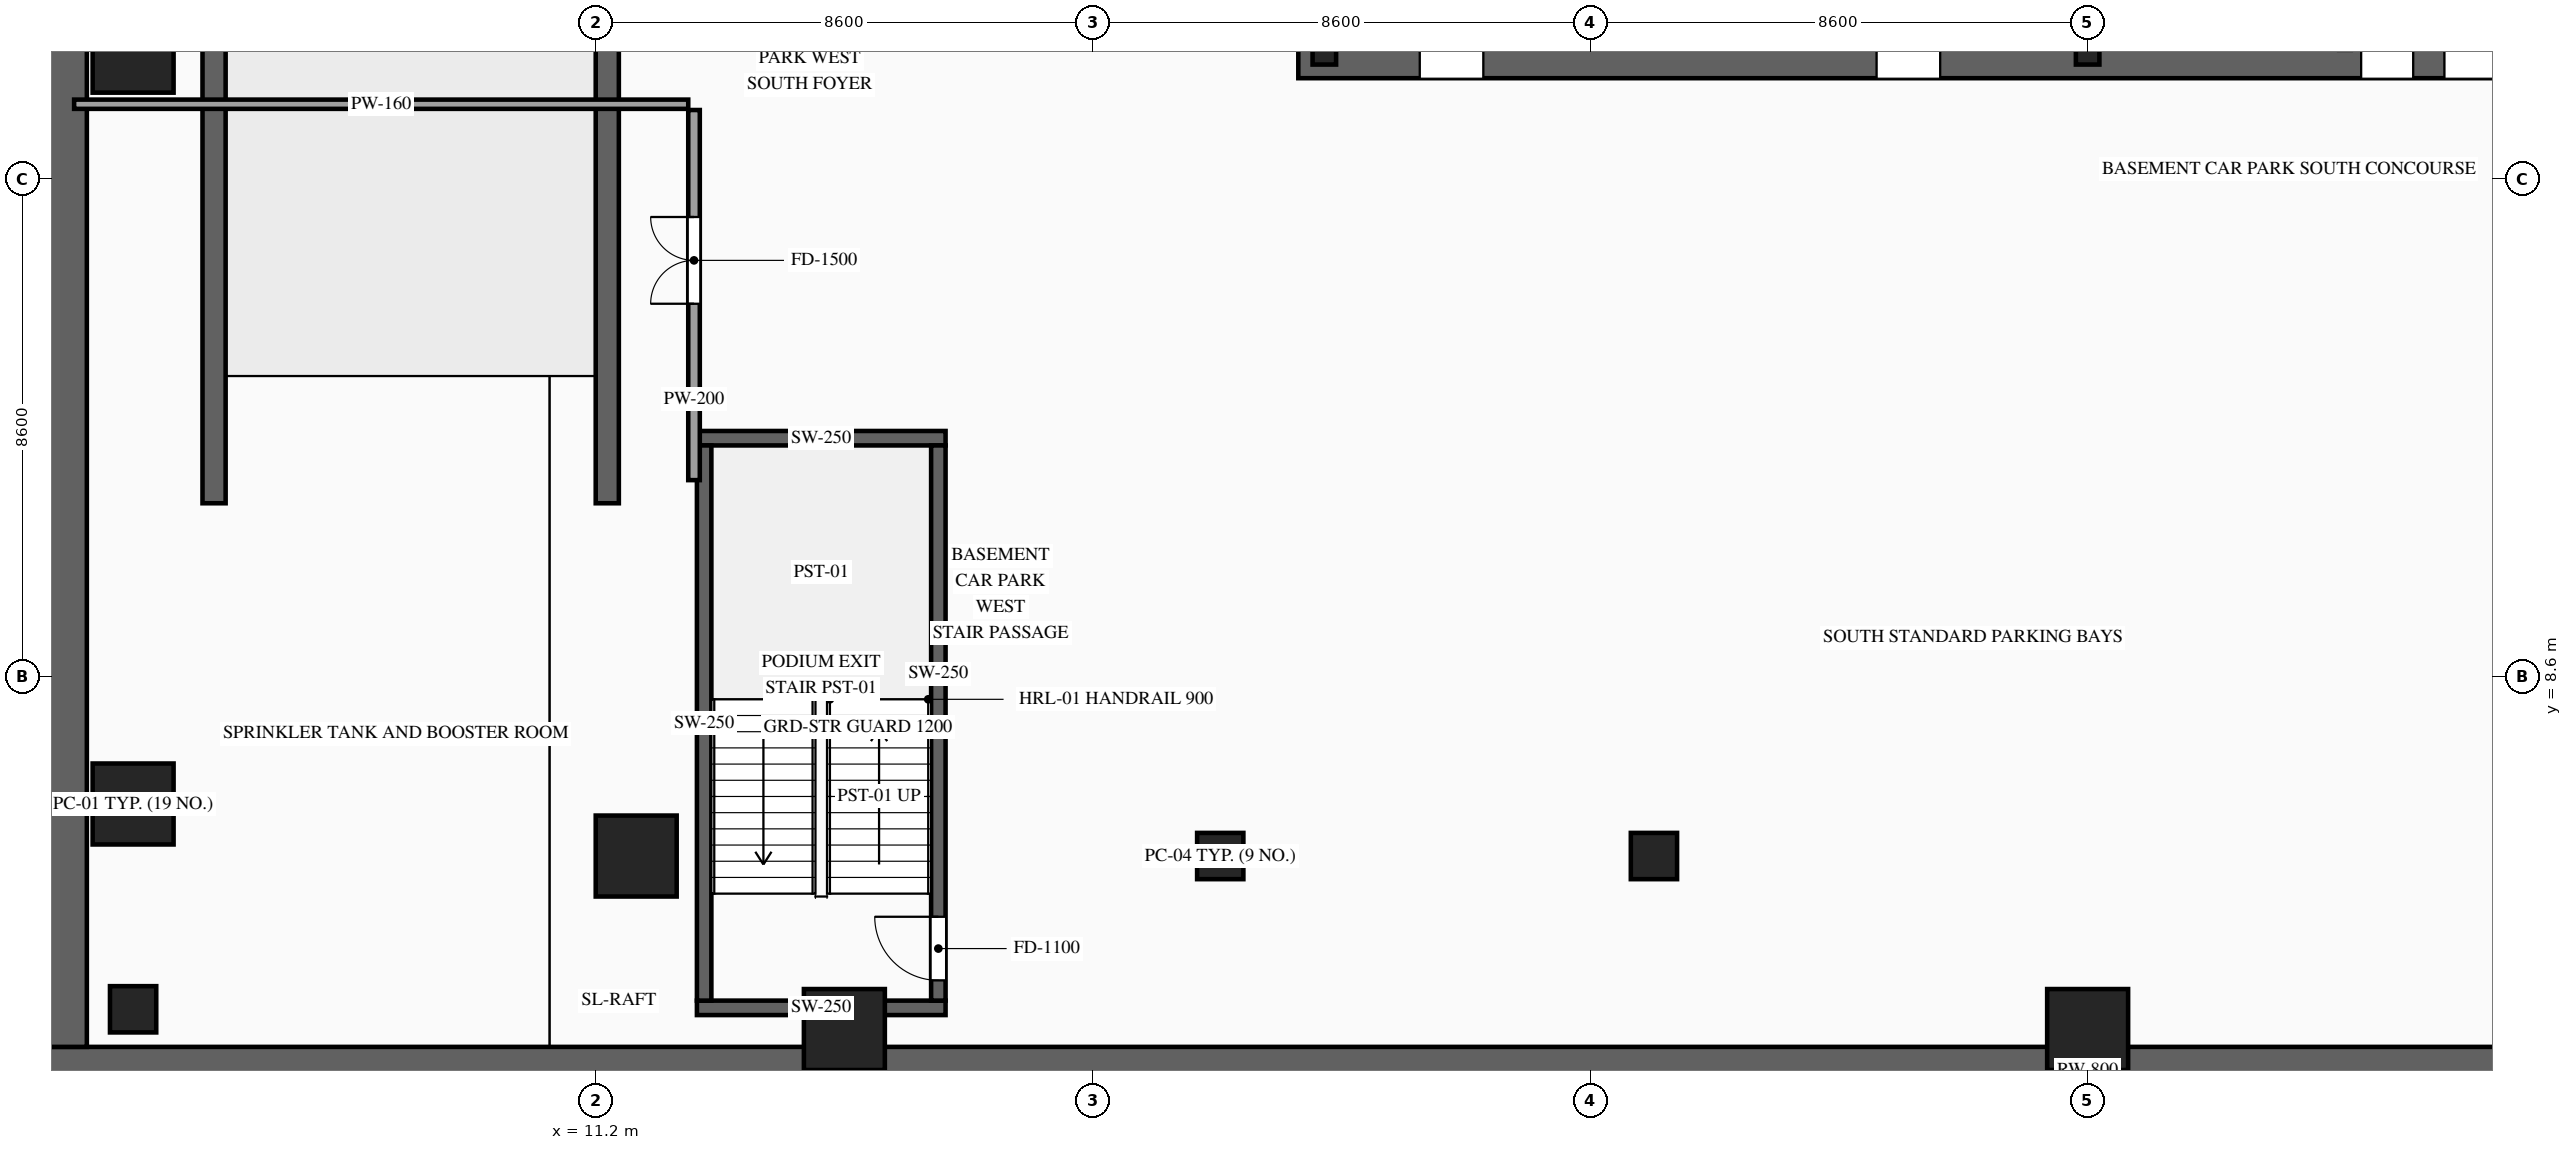
"""IFC4 building model, lengths in metres.
Left out: names, types, materials, properties, quantities, classifications, styles, units other than length and angle.
Written with IfcOpenShell. Run it as: python <this file> out.ifc"""

import sys

from ifc_helpers import new_model, si_unit, direction, frame, frame_2d, origin, origin_2d, place, context, subcontext, project, spatial, rectangle, i_section, extrude, source, transform, mapped, element, fill, save


model = new_model("IFC4")
c1 = context("Model", 3, precision=1e-05, world=origin(), true_north=direction((0.0, 1.0)))
c2 = subcontext(c1, "Body", "Model", "MODEL_VIEW")
j1 = project(units=[si_unit("LENGTHUNIT", "METRE"), si_unit("PLANEANGLEUNIT", "RADIAN")], contexts=[c1])
p1 = place(None, origin())
s1 = spatial("IfcSite", under=j1, at=p1, CompositionType="ELEMENT")
p2 = place(p1, origin())
s2 = spatial("IfcBuilding", under=s1, at=p2, CompositionType="ELEMENT")
p3 = place(p2, frame((0.0, 0.0, -9.0)))
s3 = spatial("IfcBuildingStorey", under=s2, at=p3, CompositionType="ELEMENT", Elevation=-9.0)
m1 = source(origin(), c2, "Body", "SweptSolid", [
    extrude(rectangle(XDim=70.8, YDim=0.8, at=frame_2d((35.4, 0.0))), origin(), (0.0, 0.0, 1.0), 4.5),
])
p4 = place(p3, frame((1.6, 1.8, 0.0), z_axis=(0.0, 0.0, 1.0), x_axis=(1.0, 0.0, 0.0)))
e1 = element("IfcWall", 1, at=p4, inside=s3, PredefinedType="USERDEFINED", context=c2, shape_type="MappedRepresentation", body=[
    mapped(m1, transform((0.0, 0.0, 0.0), scale=1.0)),
])
m2 = source(origin(), c2, "Body", "SweptSolid", [
    extrude(rectangle(XDim=47.2, YDim=0.8, at=frame_2d((23.6, 0.0))), origin(), (0.0, 0.0, 1.0), 4.5),
])
p5 = place(p3, frame((2.0, 2.2, 0.0), z_axis=(0.0, 0.0, 1.0), x_axis=(0.0, 1.0, 0.0)))
e2 = element("IfcWall", 2, at=p5, inside=s3, PredefinedType="USERDEFINED", context=c2, shape_type="MappedRepresentation", body=[
    mapped(m2, transform((0.0, 0.0, 0.0), scale=1.0)),
])
m3 = source(origin(), c2, "Body", "SweptSolid", [
    extrude(rectangle(XDim=36.0, YDim=0.4, at=frame_2d((18.0, 0.0))), origin(), (0.0, 0.0, 1.0), 4.5),
])
for number, where, z_axis, x_axis in (
    (3, (4.6, 11.6, 0.0), (0.0, 0.0, 1.0), (0.0, 1.0, 0.0)),
    (4, (11.4, 11.6, 0.0), (0.0, 0.0, 1.0), (0.0, 1.0, 0.0)),
):
    element("IfcWall", number, at=place(p3, frame(where, z_axis=z_axis, x_axis=x_axis)), inside=s3, PredefinedType="SOLIDWALL", context=c2, shape_type="MappedRepresentation", body=[
        mapped(m3, transform((0.0, 0.0, 0.0), scale=1.0)),
    ])
p6 = place(p3, frame((23.35, 19.4, 0.0), z_axis=(0.0, 0.0, 1.0), x_axis=(1.0, 0.0, 0.0)))
e5 = element("IfcWall", 5, at=p6, inside=s3, PredefinedType="SHEAR", context=c2, shape_type="SweptSolid", body=[
    extrude(rectangle(XDim=27.3, YDim=0.9, at=frame_2d((13.65, 0.0))), origin(), (0.0, 0.0, 1.0), 4.5),
])
p7 = place(p6, frame((2.1, 0.0, 0.0)))
e6 = element("IfcOpeningElement", 6, at=p7, cuts=e5, PredefinedType="OPENING", context=c2, shape_type="SweptSolid", body=[
    extrude(rectangle(XDim=1.1, YDim=2.2, at=frame_2d((0.55, 1.1))), frame((0.0, 0.465, 0.0), z_axis=(0.0, -1.0, 0.0), x_axis=(1.0, 0.0, 0.0)), (0.0, 0.0, 1.0), 0.93),
])
p8 = place(p6, frame((10.0, 0.0, 0.0)))
e7 = element("IfcOpeningElement", 7, at=p8, cuts=e5, PredefinedType="OPENING", context=c2, shape_type="SweptSolid", body=[
    extrude(rectangle(XDim=1.1, YDim=2.2, at=frame_2d((0.55, 1.1))), frame((0.0, 0.465, 0.0), z_axis=(0.0, -1.0, 0.0), x_axis=(1.0, 0.0, 0.0)), (0.0, 0.0, 1.0), 0.93),
])
p9 = place(p6, frame((23.2, 0.0, 0.0)))
e8 = element("IfcOpeningElement", 8, at=p9, cuts=e5, PredefinedType="OPENING", context=c2, shape_type="SweptSolid", body=[
    extrude(rectangle(XDim=1.1, YDim=2.2, at=frame_2d((0.55, 1.1))), frame((0.0, 0.465, 0.0), z_axis=(0.0, -1.0, 0.0), x_axis=(1.0, 0.0, 0.0)), (0.0, 0.0, 1.0), 0.93),
])
p10 = place(p6, frame((19.82, 0.0, 0.0)))
e9 = element("IfcOpeningElement", 9, at=p10, cuts=e5, PredefinedType="OPENING", context=c2, shape_type="SweptSolid", body=[
    extrude(rectangle(XDim=0.9, YDim=2.15, at=frame_2d((0.45, 1.075))), frame((0.0, 0.465, 0.0), z_axis=(0.0, -1.0, 0.0), x_axis=(1.0, 0.0, 0.0)), (0.0, 0.0, 1.0), 0.93),
])
p11 = place(p6, frame((18.38, 0.0, 0.0)))
e10 = element("IfcOpeningElement", 10, at=p11, cuts=e5, PredefinedType="OPENING", context=c2, shape_type="SweptSolid", body=[
    extrude(rectangle(XDim=0.9, YDim=2.15, at=frame_2d((0.45, 1.075))), frame((0.0, 0.465, 0.0), z_axis=(0.0, -1.0, 0.0), x_axis=(1.0, 0.0, 0.0)), (0.0, 0.0, 1.0), 0.93),
])
m4 = source(origin(), c2, "Body", "SweptSolid", [
    extrude(rectangle(XDim=0.8, YDim=0.8, at=origin_2d()), origin(), (0.0, 0.0, 1.0), 4.2),
])
for number, where, z_axis, x_axis in (
    (11, (22.0, 5.5, 0.0), (0.0, 0.0, 1.0), (1.0, 0.0, 0.0)),
    (12, (29.5, 5.5, 0.0), (0.0, 0.0, 1.0), (1.0, 0.0, 0.0)),
):
    element("IfcColumn", number, at=place(p3, frame(where, z_axis=z_axis, x_axis=x_axis)), inside=s3, PredefinedType="COLUMN", context=c2, shape_type="MappedRepresentation", body=[
        mapped(m4, transform((0.0, 0.0, 0.0), scale=1.0)),
    ])
m5 = source(origin(), c2, "Body", "SweptSolid", [
    extrude(i_section(OverallWidth=0.407, OverallDepth=0.428, WebThickness=0.02, FlangeThickness=0.035, at=origin_2d()), origin(), (0.0, 0.0, 1.0), 4.5),
])
for number, where, z_axis, x_axis in (
    (13, (23.8, 19.4, 0.0), (0.0, 0.0, 1.0), (1.0, 0.0, 0.0)),
    (14, (37.0, 19.4, 0.0), (0.0, 0.0, 1.0), (1.0, 0.0, 0.0)),
):
    element("IfcColumn", number, at=place(p3, frame(where, z_axis=z_axis, x_axis=x_axis)), inside=s3, PredefinedType="COLUMN", context=c2, shape_type="MappedRepresentation", body=[
        mapped(m5, transform((0.0, 0.0, 0.0), scale=1.0)),
    ])
m6 = source(origin(), c2, "Body", "SweptSolid", [
    extrude(rectangle(XDim=0.8, YDim=0.8, at=origin_2d()), origin(), (0.0, 0.0, 1.0), 4.5),
])
p12 = place(p3, frame((3.2, 2.85, 0.0), z_axis=(0.0, 0.0, 1.0), x_axis=(1.0, 0.0, 0.0)))
e15 = element("IfcColumn", 15, at=p12, inside=s3, PredefinedType="COLUMN", context=c2, shape_type="MappedRepresentation", body=[
    mapped(m6, transform((0.0, 0.0, 0.0), scale=1.0)),
])
m7 = source(origin(), c2, "Body", "SweptSolid", [
    extrude(rectangle(XDim=1.4, YDim=1.4, at=origin_2d()), origin(), (0.0, 0.0, 1.0), 4.5),
])
for number, where, z_axis, x_axis in (
    (16, (3.2, 6.4, 0.0), (0.0, 0.0, 1.0), (1.0, 0.0, 0.0)),
    (17, (3.2, 19.4, 0.0), (0.0, 0.0, 1.0), (1.0, 0.0, 0.0)),
    (18, (11.9, 5.5, 0.0), (0.0, 0.0, 1.0), (1.0, 0.0, 0.0)),
    (19, (15.5, 2.5, 0.0), (0.0, 0.0, 1.0), (1.0, 0.0, 0.0)),
    (20, (37.0, 2.5, 0.0), (0.0, 0.0, 1.0), (1.0, 0.0, 0.0)),
):
    element("IfcColumn", number, at=place(p3, frame(where, z_axis=z_axis, x_axis=x_axis)), inside=s3, PredefinedType="COLUMN", context=c2, shape_type="MappedRepresentation", body=[
        mapped(m7, transform((0.0, 0.0, 0.0), scale=1.0)),
    ])
m8 = source(origin(), c2, "Body", "SweptSolid", [
    extrude(rectangle(XDim=4.3, YDim=0.25, at=frame_2d((2.15, 0.0))), origin(), (0.0, 0.0, 1.0), 4.2),
])
for number, where, z_axis, x_axis in (
    (21, (12.95, 2.875, 0.0), (0.0, 0.0, 1.0), (1.0, 0.0, 0.0)),
    (22, (12.95, 12.725, 0.0), (0.0, 0.0, 1.0), (1.0, 0.0, 0.0)),
):
    element("IfcWall", number, at=place(p3, frame(where, z_axis=z_axis, x_axis=x_axis)), inside=s3, PredefinedType="SOLIDWALL", context=c2, shape_type="MappedRepresentation", body=[
        mapped(m8, transform((0.0, 0.0, 0.0), scale=1.0)),
    ])
m9 = source(origin(), c2, "Body", "SweptSolid", [
    extrude(rectangle(XDim=9.6, YDim=0.25, at=frame_2d((4.8, 0.0))), origin(), (0.0, 0.0, 1.0), 4.2),
])
p13 = place(p3, frame((13.075, 3.0, 0.0), z_axis=(0.0, 0.0, 1.0), x_axis=(0.0, 1.0, 0.0)))
e23 = element("IfcWall", 23, at=p13, inside=s3, PredefinedType="SOLIDWALL", context=c2, shape_type="MappedRepresentation", body=[
    mapped(m9, transform((0.0, 0.0, 0.0), scale=1.0)),
])
p14 = place(p3, frame((17.125, 3.0, 0.0), z_axis=(0.0, 0.0, 1.0), x_axis=(0.0, 1.0, 0.0)))
e24 = element("IfcWall", 24, at=p14, inside=s3, PredefinedType="SOLIDWALL", context=c2, shape_type="SweptSolid", body=[
    extrude(rectangle(XDim=9.6, YDim=0.25, at=frame_2d((4.8, 0.0))), origin(), (0.0, 0.0, 1.0), 4.2),
])
p15 = place(p14, frame((0.35, 0.0, 0.0)))
e25 = element("IfcOpeningElement", 25, at=p15, cuts=e24, PredefinedType="OPENING", context=c2, shape_type="SweptSolid", body=[
    extrude(rectangle(XDim=1.1, YDim=2.2, at=frame_2d((0.55, 1.1))), frame((0.0, 0.14, 0.0), z_axis=(0.0, -1.0, 0.0), x_axis=(1.0, 0.0, 0.0)), (0.0, 0.0, 1.0), 0.28),
])
p16 = place(p3, frame((12.9, 12.0, 0.0), z_axis=(0.0, 0.0, 1.0), x_axis=(0.0, 1.0, 0.0)))
e26 = element("IfcWall", 26, at=p16, inside=s3, PredefinedType="PARTITIONING", context=c2, shape_type="SweptSolid", body=[
    extrude(rectangle(XDim=6.4, YDim=0.2, at=frame_2d((3.2, 0.0))), origin(), (0.0, 0.0, 1.0), 4.2),
])
p17 = place(p16, frame((3.05, 0.0, 0.0)))
e27 = element("IfcOpeningElement", 27, at=p17, cuts=e26, PredefinedType="OPENING", context=c2, shape_type="SweptSolid", body=[
    extrude(rectangle(XDim=1.5, YDim=2.3, at=frame_2d((0.75, 1.15))), frame((0.0, 0.115, 0.0), z_axis=(0.0, -1.0, 0.0), x_axis=(1.0, 0.0, 0.0)), (0.0, 0.0, 1.0), 0.23),
])
m10 = source(origin(), c2, "Body", "SweptSolid", [
    extrude(rectangle(XDim=10.62, YDim=0.16, at=frame_2d((5.31, 0.0))), origin(), (0.0, 0.0, 1.0), 4.2),
])
p18 = place(p3, frame((2.18, 18.5, 0.0), z_axis=(0.0, 0.0, 1.0), x_axis=(1.0, 0.0, 0.0)))
e28 = element("IfcWall", 28, at=p18, inside=s3, PredefinedType="PARTITIONING", context=c2, shape_type="MappedRepresentation", body=[
    mapped(m10, transform((0.0, 0.0, 0.0), scale=1.0)),
])
m11 = source(origin(), c2, "Body", "SweptSolid", [
    extrude(rectangle(XDim=1.1, YDim=2.2, at=frame_2d((0.55, 1.1))), frame((0.0, 0.025, 0.0), z_axis=(0.0, -1.0, 0.0), x_axis=(1.0, 0.0, 0.0)), (0.0, 0.0, 1.0), 0.05),
])
p19 = place(p15, origin())
e29 = element("IfcDoor", 29, at=p19, inside=s3, OperationType="SINGLE_SWING_RIGHT", PredefinedType="DOOR", context=c2, shape_type="MappedRepresentation", body=[
    mapped(m11, transform((0.0, 0.0, 0.0), scale=1.0)),
])
fill(e25, e29)
p20 = place(p7, origin())
e30 = element("IfcDoor", 30, at=p20, inside=s3, OperationType="SINGLE_SWING_LEFT", PredefinedType="DOOR", context=c2, shape_type="MappedRepresentation", body=[
    mapped(m11, transform((0.0, 0.0, 0.0), scale=1.0)),
])
fill(e6, e30)
p21 = place(p8, origin())
e31 = element("IfcDoor", 31, at=p21, inside=s3, OperationType="SINGLE_SWING_RIGHT", PredefinedType="DOOR", context=c2, shape_type="MappedRepresentation", body=[
    mapped(m11, transform((0.0, 0.0, 0.0), scale=1.0)),
])
fill(e7, e31)
m12 = source(origin(), c2, "Body", "SweptSolid", [
    extrude(rectangle(XDim=0.9, YDim=2.15, at=frame_2d((0.45, 1.075))), frame((0.0, 0.025, 0.0), z_axis=(0.0, -1.0, 0.0), x_axis=(1.0, 0.0, 0.0)), (0.0, 0.0, 1.0), 0.05),
])
p22 = place(p10, origin())
e32 = element("IfcDoor", 32, at=p22, inside=s3, OperationType="SINGLE_SWING_RIGHT", PredefinedType="DOOR", context=c2, shape_type="MappedRepresentation", body=[
    mapped(m12, transform((0.0, 0.0, 0.0), scale=1.0)),
])
fill(e9, e32)
p23 = place(p11, origin())
e33 = element("IfcDoor", 33, at=p23, inside=s3, OperationType="SINGLE_SWING_LEFT", PredefinedType="DOOR", context=c2, shape_type="MappedRepresentation", body=[
    mapped(m12, transform((0.0, 0.0, 0.0), scale=1.0)),
])
fill(e10, e33)
m13 = source(origin(), c2, "Body", "SweptSolid", [
    extrude(rectangle(XDim=1.5, YDim=2.3, at=frame_2d((0.75, 1.15))), frame((0.0, 0.025, 0.0), z_axis=(0.0, -1.0, 0.0), x_axis=(1.0, 0.0, 0.0)), (0.0, 0.0, 1.0), 0.05),
])
p24 = place(p17, origin())
e34 = element("IfcDoor", 34, at=p24, inside=s3, OperationType="DOUBLE_DOOR_SINGLE_SWING", PredefinedType="DOOR", context=c2, shape_type="MappedRepresentation", body=[
    mapped(m13, transform((0.0, 0.0, 0.0), scale=1.0)),
])
fill(e27, e34)
save(model, sys.argv[1])
